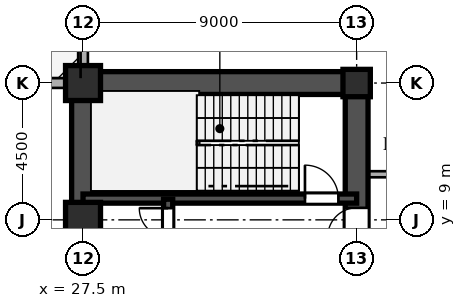
"""IFC4 building model, lengths in metres.
Left out: names, types, materials, properties, quantities, classifications, styles, units other than length and angle.
Written with IfcOpenShell. Run it as: python <this file> out.ifc"""

import sys

from ifc_helpers import new_model, si_unit, direction, frame, frame_2d, origin, origin_2d, place, context, subcontext, project, spatial, rectangle, hollow_rectangle, i_section, extrude, source, transform, mapped, element, fill, save


model = new_model("IFC4")
c1 = context("Model", 3, precision=1e-05, world=origin(), true_north=direction((0.0, 1.0)))
c2 = subcontext(c1, "Body", "Model", "MODEL_VIEW")
j1 = project(units=[si_unit("LENGTHUNIT", "METRE"), si_unit("PLANEANGLEUNIT", "RADIAN")], contexts=[c1])
p1 = place(None, origin())
s1 = spatial("IfcSite", under=j1, at=p1, CompositionType="ELEMENT")
p2 = place(p1, origin())
s2 = spatial("IfcBuilding", under=s1, at=p2, CompositionType="ELEMENT")
p3 = place(p2, frame((0.0, 0.0, 14.4)))
s3 = spatial("IfcBuildingStorey", under=s2, at=p3, CompositionType="ELEMENT", Elevation=14.4)
m1 = source(origin(), c2, "Body", "SweptSolid", [
    extrude(hollow_rectangle(XDim=1.15, YDim=1.15, WallThickness=0.048, at=origin_2d()), origin(), (0.0, 0.0, 1.0), 4.5),
])
for number, where, z_axis, x_axis in (
    (1, (27.5, 9.0, 0.0), (0.0, 0.0, 1.0), (1.0, 0.0, 0.0)),
    (2, (27.5, 13.5, 0.0), (0.0, 0.0, 1.0), (1.0, 0.0, 0.0)),
):
    element("IfcColumn", number, at=place(p3, frame(where, z_axis=z_axis, x_axis=x_axis)), inside=s3, PredefinedType="COLUMN", context=c2, shape_type="MappedRepresentation", body=[
        mapped(m1, transform((0.0, 0.0, 0.0), scale=1.0)),
    ])
m2 = source(origin(), c2, "Body", "SweptSolid", [
    extrude(i_section(OverallWidth=0.9, OverallDepth=0.9, WebThickness=0.036, FlangeThickness=0.055, at=origin_2d()), origin(), (0.0, 0.0, 1.0), 4.5),
])
p4 = place(p3, frame((36.5, 13.5, 0.0), z_axis=(0.0, 0.0, 1.0), x_axis=(1.0, 0.0, 0.0)))
e3 = element("IfcColumn", 3, at=p4, inside=s3, PredefinedType="COLUMN", context=c2, shape_type="MappedRepresentation", body=[
    mapped(m2, transform((0.0, 0.0, 0.0), scale=1.0)),
])
p5 = place(p3, frame((72.463, 10.015, 0.0), z_axis=(0.0, 0.0, 1.0), x_axis=(-0.926944846568, 0.375197616492, 0.0)))
e4 = element("IfcWall", 4, at=p5, inside=s3, PredefinedType="SOLIDWALL", context=c2, shape_type="SweptSolid", body=[
    extrude(rectangle(XDim=45.23, YDim=0.32, at=frame_2d((22.615, 0.0))), origin(), (0.0, 0.0, 1.0), 4.28),
])
p6 = place(p5, frame((6.0, 0.0, 0.85)))
e5 = element("IfcOpeningElement", 5, at=p6, cuts=e4, PredefinedType="OPENING", context=c2, shape_type="SweptSolid", body=[
    extrude(rectangle(XDim=1.8, YDim=2.0, at=frame_2d((0.9, 1.0))), frame((0.0, 0.17, 0.0), z_axis=(0.0, -1.0, 0.0), x_axis=(1.0, 0.0, 0.0)), (0.0, 0.0, 1.0), 0.34),
])
p7 = place(p5, frame((36.23, 0.0, 0.85)))
e6 = element("IfcOpeningElement", 6, at=p7, cuts=e4, PredefinedType="OPENING", context=c2, shape_type="SweptSolid", body=[
    extrude(rectangle(XDim=1.8, YDim=2.0, at=frame_2d((0.9, 1.0))), frame((0.0, 0.17, 0.0), z_axis=(0.0, -1.0, 0.0), x_axis=(1.0, 0.0, 0.0)), (0.0, 0.0, 1.0), 0.34),
])
p8 = place(p3, frame((27.5, 13.55, 0.0), z_axis=(0.0, 0.0, 1.0), x_axis=(0.0, 1.0, 0.0)))
e7 = element("IfcWall", 7, at=p8, inside=s3, PredefinedType="SOLIDWALL", context=c2, shape_type="SweptSolid", body=[
    extrude(rectangle(XDim=10.4, YDim=0.32, at=frame_2d((5.2, 0.0))), origin(), (0.0, 0.0, 1.0), 2.78),
])
p9 = place(p3, frame((27.46, 13.5, 0.0), z_axis=(0.0, 0.0, 1.0), x_axis=(-1.0, 0.0, 0.0)))
e8 = element("IfcWall", 8, at=p9, inside=s3, PredefinedType="SOLIDWALL", context=c2, shape_type="SweptSolid", body=[
    extrude(rectangle(XDim=54.92, YDim=0.32, at=frame_2d((27.46, 0.0))), origin(), (0.0, 0.0, 1.0), 4.28),
])
p10 = place(p9, frame((34.4, 0.0, 0.0)))
e9 = element("IfcOpeningElement", 9, at=p10, cuts=e8, PredefinedType="OPENING", context=c2, shape_type="SweptSolid", body=[
    extrude(rectangle(XDim=1.8, YDim=2.3, at=frame_2d((0.9, 1.15))), frame((0.0, 0.17, 0.0), z_axis=(0.0, -1.0, 0.0), x_axis=(1.0, 0.0, 0.0)), (0.0, 0.0, 1.0), 0.34),
])
p11 = place(p9, frame((37.4, 0.0, 0.0)))
e10 = element("IfcOpeningElement", 10, at=p11, cuts=e8, PredefinedType="OPENING", context=c2, shape_type="SweptSolid", body=[
    extrude(rectangle(XDim=1.8, YDim=2.3, at=frame_2d((0.9, 1.15))), frame((0.0, 0.17, 0.0), z_axis=(0.0, -1.0, 0.0), x_axis=(1.0, 0.0, 0.0)), (0.0, 0.0, 1.0), 0.34),
])
p12 = place(p9, frame((4.5, 0.0, 0.8)))
e11 = element("IfcOpeningElement", 11, at=p12, cuts=e8, PredefinedType="OPENING", context=c2, shape_type="SweptSolid", body=[
    extrude(rectangle(XDim=1.65, YDim=1.85, at=frame_2d((0.825, 0.925))), frame((0.0, 0.17, 0.0), z_axis=(0.0, -1.0, 0.0), x_axis=(1.0, 0.0, 0.0)), (0.0, 0.0, 1.0), 0.34),
])
p13 = place(p9, frame((25.0, 0.0, 0.8)))
e12 = element("IfcOpeningElement", 12, at=p13, cuts=e8, PredefinedType="OPENING", context=c2, shape_type="SweptSolid", body=[
    extrude(rectangle(XDim=1.65, YDim=1.85, at=frame_2d((0.825, 0.925))), frame((0.0, 0.17, 0.0), z_axis=(0.0, -1.0, 0.0), x_axis=(1.0, 0.0, 0.0)), (0.0, 0.0, 1.0), 0.34),
])
p14 = place(p9, frame((46.42, 0.0, 0.8)))
e13 = element("IfcOpeningElement", 13, at=p14, cuts=e8, PredefinedType="OPENING", context=c2, shape_type="SweptSolid", body=[
    extrude(rectangle(XDim=1.65, YDim=1.85, at=frame_2d((0.825, 0.925))), frame((0.0, 0.17, 0.0), z_axis=(0.0, -1.0, 0.0), x_axis=(1.0, 0.0, 0.0)), (0.0, 0.0, 1.0), 0.34),
])
p15 = place(p3, frame((27.5, 1.3, 0.0), z_axis=(0.0, 0.0, 1.0), x_axis=(0.0, 1.0, 0.0)))
e14 = element("IfcWall", 14, at=p15, inside=s3, PredefinedType="SHEAR", context=c2, shape_type="SweptSolid", body=[
    extrude(rectangle(XDim=12.2, YDim=0.75, at=frame_2d((6.1, 0.0))), origin(), (0.0, 0.0, 1.0), 4.28),
])
p16 = place(p3, frame((27.5, 13.5, 0.0), z_axis=(0.0, 0.0, 1.0), x_axis=(1.0, 0.0, 0.0)))
e15 = element("IfcWall", 15, at=p16, inside=s3, PredefinedType="SHEAR", context=c2, shape_type="SweptSolid", body=[
    extrude(rectangle(XDim=9.0, YDim=0.75, at=frame_2d((4.5, 0.0))), origin(), (0.0, 0.0, 1.0), 4.28),
])
p17 = place(p3, frame((36.5, 8.2, 0.0), z_axis=(0.0, 0.0, 1.0), x_axis=(0.0, 1.0, 0.0)))
e16 = element("IfcWall", 16, at=p17, inside=s3, PredefinedType="SHEAR", context=c2, shape_type="SweptSolid", body=[
    extrude(rectangle(XDim=5.45, YDim=0.75, at=frame_2d((2.725, 0.0))), origin(), (0.0, 0.0, 1.0), 4.28),
])
p18 = place(p17, frame((0.245, 0.0, 0.0)))
e17 = element("IfcOpeningElement", 17, at=p18, cuts=e16, PredefinedType="OPENING", context=c2, shape_type="SweptSolid", body=[
    extrude(rectangle(XDim=0.95, YDim=2.15, at=frame_2d((0.475, 1.075))), frame((0.0, 0.385, 0.0), z_axis=(0.0, -1.0, 0.0), x_axis=(1.0, 0.0, 0.0)), (0.0, 0.0, 1.0), 0.77),
])
p19 = place(p3, frame((27.5, 9.7, 0.0), z_axis=(0.0, 0.0, 1.0), x_axis=(1.0, 0.0, 0.0)))
e18 = element("IfcWall", 18, at=p19, inside=s3, PredefinedType="SHEAR", context=c2, shape_type="SweptSolid", body=[
    extrude(rectangle(XDim=9.0, YDim=0.3, at=frame_2d((4.5, 0.0))), origin(), (0.0, 0.0, 1.0), 4.28),
])
p20 = place(p19, frame((7.3, 0.0, 0.0)))
e19 = element("IfcOpeningElement", 19, at=p20, cuts=e18, PredefinedType="OPENING", context=c2, shape_type="SweptSolid", body=[
    extrude(rectangle(XDim=1.1, YDim=2.2, at=frame_2d((0.55, 1.1))), frame((0.0, 0.16, 0.0), z_axis=(0.0, -1.0, 0.0), x_axis=(1.0, 0.0, 0.0)), (0.0, 0.0, 1.0), 0.32),
])
p21 = place(p3, frame((30.3, 8.15, 0.0), z_axis=(0.0, 0.0, 1.0), x_axis=(0.0, 1.0, 0.0)))
e20 = element("IfcWall", 20, at=p21, inside=s3, PredefinedType="SHEAR", context=c2, shape_type="SweptSolid", body=[
    extrude(rectangle(XDim=1.53, YDim=0.3, at=frame_2d((0.765, 0.0))), origin(), (0.0, 0.0, 1.0), 4.28),
])
p22 = place(p21, frame((0.285, 0.0, 0.0)))
e21 = element("IfcOpeningElement", 21, at=p22, cuts=e20, PredefinedType="OPENING", context=c2, shape_type="SweptSolid", body=[
    extrude(rectangle(XDim=0.95, YDim=2.15, at=frame_2d((0.475, 1.075))), frame((0.0, 0.16, 0.0), z_axis=(0.0, -1.0, 0.0), x_axis=(1.0, 0.0, 0.0)), (0.0, 0.0, 1.0), 0.32),
])
p23 = place(p3, frame((36.88, 10.5, 0.0), z_axis=(0.0, 0.0, 1.0), x_axis=(1.0, 0.0, 0.0)))
e22 = element("IfcWall", 22, at=p23, inside=s3, PredefinedType="PARTITIONING", context=c2, shape_type="SweptSolid", body=[
    extrude(rectangle(XDim=2.035, YDim=0.2, at=frame_2d((1.018, 0.0))), origin(), (0.0, 0.0, 1.0), 4.28),
])
m3 = source(origin(), c2, "Body", "SweptSolid", [
    extrude(rectangle(XDim=0.95, YDim=2.15, at=frame_2d((0.475, 1.075))), frame((0.0, 0.025, 0.0), z_axis=(0.0, -1.0, 0.0), x_axis=(1.0, 0.0, 0.0)), (0.0, 0.0, 1.0), 0.05),
])
p24 = place(p18, origin())
e23 = element("IfcDoor", 23, at=p24, inside=s3, OperationType="SINGLE_SWING_LEFT", PredefinedType="DOOR", context=c2, shape_type="MappedRepresentation", body=[
    mapped(m3, transform((0.0, 0.0, 0.0), scale=1.0)),
])
fill(e17, e23)
m4 = source(origin(), c2, "Body", "SweptSolid", [
    extrude(rectangle(XDim=1.1, YDim=2.2, at=frame_2d((0.55, 1.1))), frame((0.0, 0.025, 0.0), z_axis=(0.0, -1.0, 0.0), x_axis=(1.0, 0.0, 0.0)), (0.0, 0.0, 1.0), 0.05),
])
p25 = place(p20, origin())
e24 = element("IfcDoor", 24, at=p25, inside=s3, OperationType="SINGLE_SWING_LEFT", PredefinedType="DOOR", context=c2, shape_type="MappedRepresentation", body=[
    mapped(m4, transform((0.0, 0.0, 0.0), scale=1.0)),
])
fill(e19, e24)
p26 = place(p22, origin())
e25 = element("IfcDoor", 25, at=p26, inside=s3, OperationType="SINGLE_SWING_RIGHT", PredefinedType="DOOR", context=c2, shape_type="MappedRepresentation", body=[
    mapped(m3, transform((0.0, 0.0, 0.0), scale=1.0)),
])
fill(e21, e25)
save(model, sys.argv[1])
